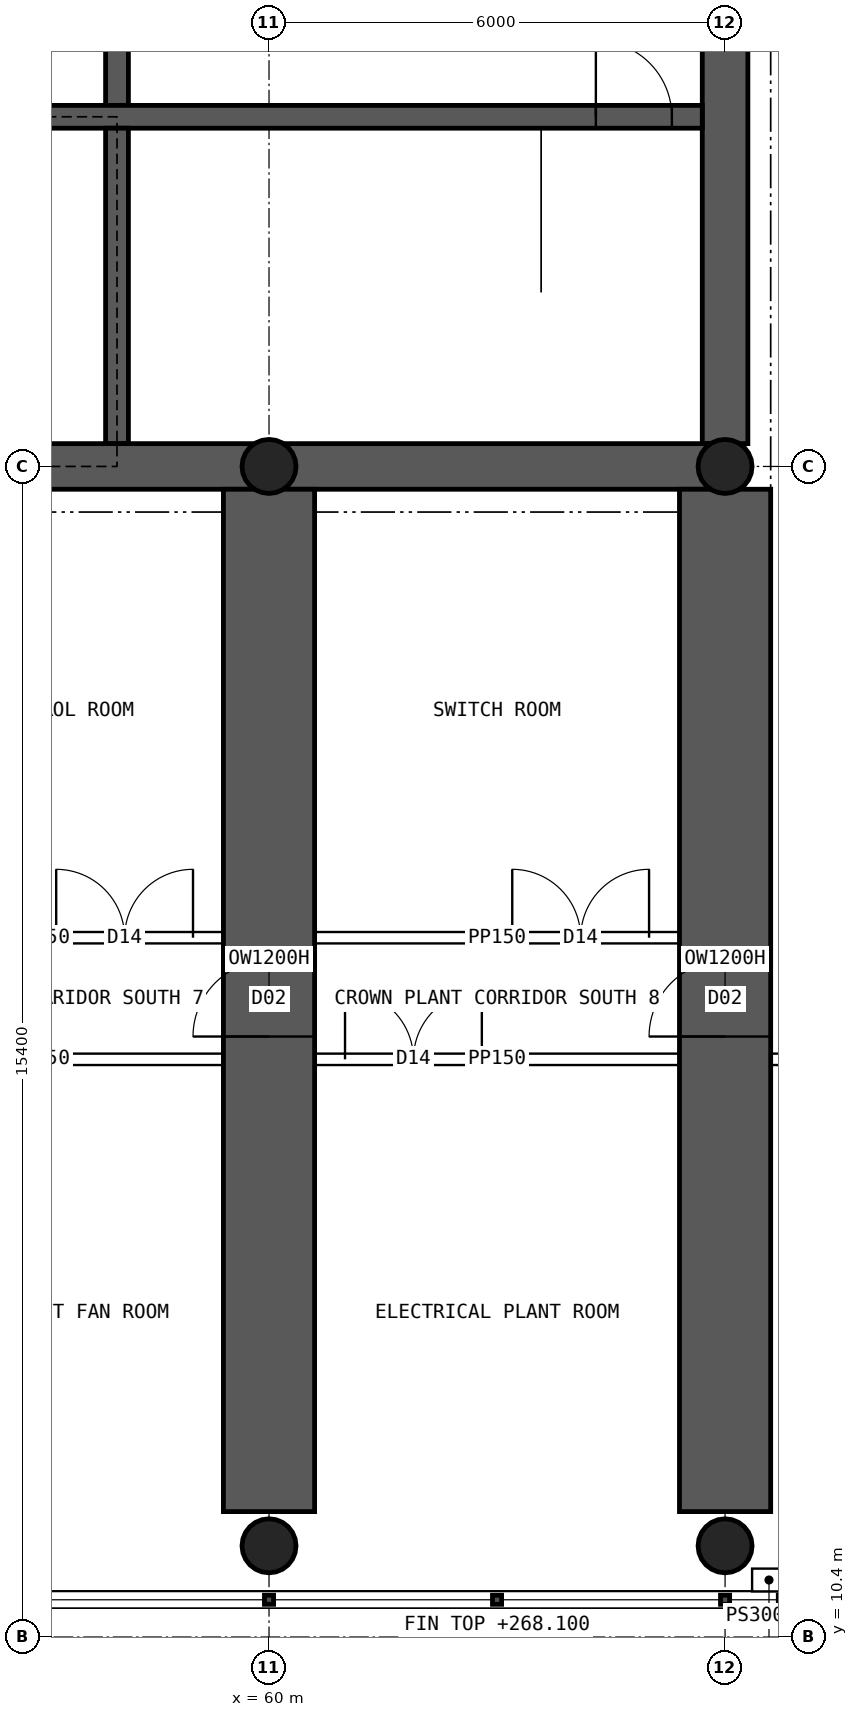
"""IFC4 building model, lengths in metres.
Left out: names, types, materials, properties, quantities, classifications, styles, units other than length and angle.
Written with IfcOpenShell. Run it as: python <this file> out.ifc"""

import sys

from ifc_helpers import new_model, si_unit, direction, frame, frame_2d, origin, origin_2d, place, context, subcontext, project, spatial, polyline, rectangle, hollow_circle, outline, extrude, element, fill, save


model = new_model("IFC4")
c1 = context("Model", 3, precision=1e-05, world=origin(), true_north=direction((0.0, 1.0)))
c2 = subcontext(c1, "Body", "Model", "MODEL_VIEW")
j1 = project(units=[si_unit("LENGTHUNIT", "METRE"), si_unit("PLANEANGLEUNIT", "RADIAN")], contexts=[c1])
p1 = place(None, origin())
s1 = spatial("IfcSite", under=j1, at=p1, CompositionType="ELEMENT")
p2 = place(p1, origin())
s2 = spatial("IfcBuilding", under=s1, at=p2, CompositionType="ELEMENT")
p3 = place(p2, frame((0.0, 0.0, 262.3)))
s3 = spatial("IfcBuildingStorey", under=s2, at=p3, CompositionType="ELEMENT", Elevation=262.3)
p4 = place(p3, frame((18.0, 25.8, 0.0), z_axis=(0.0, 0.0, 1.0), x_axis=(1.0, 0.0, 0.0)))
e1 = element("IfcWall", 1, at=p4, inside=s3, PredefinedType="SHEAR", context=c2, shape_type="SweptSolid", body=[
    extrude(rectangle(XDim=48.0, YDim=0.6, at=frame_2d((24.0, 0.0))), origin(), (0.0, 0.0, 1.0), 6.0),
])
p5 = place(p3, frame((66.0, 26.1, 0.0), z_axis=(0.0, 0.0, 1.0), x_axis=(0.0, 1.0, 0.0)))
e2 = element("IfcWall", 2, at=p5, inside=s3, PredefinedType="SHEAR", context=c2, shape_type="SweptSolid", body=[
    extrude(rectangle(XDim=11.8, YDim=0.6, at=frame_2d((5.9, 0.0))), origin(), (0.0, 0.0, 1.0), 6.0),
])
p6 = place(p5, frame((5.2, 0.0, 0.0)))
e3 = element("IfcOpeningElement", 3, at=p6, cuts=e2, PredefinedType="OPENING", context=c2, shape_type="SweptSolid", body=[
    extrude(rectangle(XDim=1.2, YDim=2.1, at=frame_2d((0.6, 1.05))), frame((0.0, 0.31, 0.0), z_axis=(0.0, -1.0, 0.0), x_axis=(1.0, 0.0, 0.0)), (0.0, 0.0, 1.0), 0.62),
])
p7 = place(p3, frame((18.3, 30.4, 0.0), z_axis=(0.0, 0.0, 1.0), x_axis=(1.0, 0.0, 0.0)))
e4 = element("IfcWall", 4, at=p7, inside=s3, PredefinedType="SHEAR", context=c2, shape_type="SweptSolid", body=[
    extrude(rectangle(XDim=47.4, YDim=0.3, at=frame_2d((23.7, 0.0))), origin(), (0.0, 0.0, 1.0), 6.0),
])
p8 = place(p7, frame((0.4, 0.0, 0.0)))
e5 = element("IfcOpeningElement", 5, at=p8, cuts=e4, PredefinedType="OPENING", context=c2, shape_type="SweptSolid", body=[
    extrude(rectangle(XDim=1.0, YDim=2.1, at=frame_2d((0.5, 1.05))), frame((0.0, 0.16, 0.0), z_axis=(0.0, -1.0, 0.0), x_axis=(1.0, 0.0, 0.0)), (0.0, 0.0, 1.0), 0.32),
])
p9 = place(p7, frame((46.0, 0.0, 0.0)))
e6 = element("IfcOpeningElement", 6, at=p9, cuts=e4, PredefinedType="OPENING", context=c2, shape_type="SweptSolid", body=[
    extrude(rectangle(XDim=1.0, YDim=2.1, at=frame_2d((0.5, 1.05))), frame((0.0, 0.16, 0.0), z_axis=(0.0, -1.0, 0.0), x_axis=(1.0, 0.0, 0.0)), (0.0, 0.0, 1.0), 0.32),
])
p10 = place(p7, frame((19.025, 0.0, 0.0)))
e7 = element("IfcOpeningElement", 7, at=p10, cuts=e4, PredefinedType="OPENING", context=c2, shape_type="SweptSolid", body=[
    extrude(rectangle(XDim=0.9, YDim=2.1, at=frame_2d((0.45, 1.05))), frame((0.0, 0.16, 0.0), z_axis=(0.0, -1.0, 0.0), x_axis=(1.0, 0.0, 0.0)), (0.0, 0.0, 1.0), 0.32),
])
p11 = place(p7, frame((24.525, 0.0, 0.0)))
e8 = element("IfcOpeningElement", 8, at=p11, cuts=e4, PredefinedType="OPENING", context=c2, shape_type="SweptSolid", body=[
    extrude(rectangle(XDim=0.9, YDim=2.1, at=frame_2d((0.45, 1.05))), frame((0.0, 0.16, 0.0), z_axis=(0.0, -1.0, 0.0), x_axis=(1.0, 0.0, 0.0)), (0.0, 0.0, 1.0), 0.32),
])
p12 = place(p7, frame((30.317, 0.0, 0.0)))
e9 = element("IfcOpeningElement", 9, at=p12, cuts=e4, PredefinedType="OPENING", context=c2, shape_type="SweptSolid", body=[
    extrude(rectangle(XDim=1.1, YDim=2.1, at=frame_2d((0.55, 1.05))), frame((0.0, 0.16, 0.0), z_axis=(0.0, -1.0, 0.0), x_axis=(1.0, 0.0, 0.0)), (0.0, 0.0, 1.0), 0.32),
])
p13 = place(p7, frame((33.85, 0.0, 0.0)))
e10 = element("IfcOpeningElement", 10, at=p13, cuts=e4, PredefinedType="OPENING", context=c2, shape_type="SweptSolid", body=[
    extrude(rectangle(XDim=1.1, YDim=2.1, at=frame_2d((0.55, 1.05))), frame((0.0, 0.16, 0.0), z_axis=(0.0, -1.0, 0.0), x_axis=(1.0, 0.0, 0.0)), (0.0, 0.0, 1.0), 0.32),
])
p14 = place(p7, frame((37.383, 0.0, 0.0)))
e11 = element("IfcOpeningElement", 11, at=p14, cuts=e4, PredefinedType="OPENING", context=c2, shape_type="SweptSolid", body=[
    extrude(rectangle(XDim=1.1, YDim=2.1, at=frame_2d((0.55, 1.05))), frame((0.0, 0.16, 0.0), z_axis=(0.0, -1.0, 0.0), x_axis=(1.0, 0.0, 0.0)), (0.0, 0.0, 1.0), 0.32),
])
p15 = place(p3, frame((58.0, 26.1, 0.0), z_axis=(0.0, 0.0, 1.0), x_axis=(0.0, 1.0, 0.0)))
e12 = element("IfcWall", 12, at=p15, inside=s3, PredefinedType="SHEAR", context=c2, shape_type="SweptSolid", body=[
    extrude(rectangle(XDim=4.15, YDim=0.3, at=frame_2d((2.075, 0.0))), origin(), (0.0, 0.0, 1.0), 6.0),
])
p16 = place(p3, frame((58.0, 30.55, 0.0), z_axis=(0.0, 0.0, 1.0), x_axis=(0.0, 1.0, 0.0)))
e13 = element("IfcWall", 13, at=p16, inside=s3, PredefinedType="SHEAR", context=c2, shape_type="SweptSolid", body=[
    extrude(rectangle(XDim=3.9, YDim=0.3, at=frame_2d((1.95, 0.0))), origin(), (0.0, 0.0, 1.0), 6.0),
])
p17 = place(p16, frame((1.4, 0.0, 0.0)))
e14 = element("IfcOpeningElement", 14, at=p17, cuts=e13, PredefinedType="OPENING", context=c2, shape_type="SweptSolid", body=[
    extrude(rectangle(XDim=1.2, YDim=2.1, at=frame_2d((0.6, 1.05))), frame((0.0, 0.16, 0.0), z_axis=(0.0, -1.0, 0.0), x_axis=(1.0, 0.0, 0.0)), (0.0, 0.0, 1.0), 0.32),
])
p18 = place(p3, frame((60.0, 12.05, 0.0), z_axis=(0.0, 0.0, 1.0), x_axis=(0.0, 1.0, 0.0)))
e15 = element("IfcWall", 15, at=p18, inside=s3, PredefinedType="SHEAR", context=c2, shape_type="SweptSolid", body=[
    extrude(rectangle(XDim=13.45, YDim=1.2, at=frame_2d((6.725, 0.0))), origin(), (0.0, 0.0, 1.0), 4.4),
])
p19 = place(p18, frame((6.25, 0.0, 0.0)))
e16 = element("IfcOpeningElement", 16, at=p19, cuts=e15, PredefinedType="OPENING", context=c2, shape_type="SweptSolid", body=[
    extrude(rectangle(XDim=1.0, YDim=2.1, at=frame_2d((0.5, 1.05))), frame((0.0, 0.61, 0.0), z_axis=(0.0, -1.0, 0.0), x_axis=(1.0, 0.0, 0.0)), (0.0, 0.0, 1.0), 1.22),
])
p20 = place(p3, frame((66.0, 12.05, 0.0), z_axis=(0.0, 0.0, 1.0), x_axis=(0.0, 1.0, 0.0)))
e17 = element("IfcWall", 17, at=p20, inside=s3, PredefinedType="SHEAR", context=c2, shape_type="SweptSolid", body=[
    extrude(rectangle(XDim=13.45, YDim=1.2, at=frame_2d((6.725, 0.0))), origin(), (0.0, 0.0, 1.0), 4.4),
])
p21 = place(p20, frame((6.25, 0.0, 0.0)))
e18 = element("IfcOpeningElement", 18, at=p21, cuts=e17, PredefinedType="OPENING", context=c2, shape_type="SweptSolid", body=[
    extrude(rectangle(XDim=1.0, YDim=2.1, at=frame_2d((0.5, 1.05))), frame((0.0, 0.61, 0.0), z_axis=(0.0, -1.0, 0.0), x_axis=(1.0, 0.0, 0.0)), (0.0, 0.0, 1.0), 1.22),
])
p22 = place(p3, frame((60.0, 11.6, 0.0), z_axis=(0.0, 0.0, 1.0), x_axis=(1.0, 0.0, 0.0)))
e19 = element("IfcColumn", 19, at=p22, inside=s3, PredefinedType="COLUMN", context=c2, shape_type="SweptSolid", body=[
    extrude(hollow_circle(Radius=0.355, WallThickness=0.025, at=origin_2d()), origin(), (0.0, 0.0, 1.0), 4.885),
])
p23 = place(p3, frame((60.0, 25.8, 0.0), z_axis=(0.0, 0.0, 1.0), x_axis=(1.0, 0.0, 0.0)))
e20 = element("IfcColumn", 20, at=p23, inside=s3, PredefinedType="COLUMN", context=c2, shape_type="SweptSolid", body=[
    extrude(hollow_circle(Radius=0.355, WallThickness=0.025, at=origin_2d()), origin(), (0.0, 0.0, 1.0), 8.426),
])
p24 = place(p3, frame((66.0, 11.6, 0.0), z_axis=(0.0, 0.0, 1.0), x_axis=(1.0, 0.0, 0.0)))
e21 = element("IfcColumn", 21, at=p24, inside=s3, PredefinedType="COLUMN", context=c2, shape_type="SweptSolid", body=[
    extrude(hollow_circle(Radius=0.355, WallThickness=0.025, at=origin_2d()), origin(), (0.0, 0.0, 1.0), 4.885),
])
p25 = place(p3, frame((66.0, 25.8, 0.0), z_axis=(0.0, 0.0, 1.0), x_axis=(1.0, 0.0, 0.0)))
e22 = element("IfcColumn", 22, at=p25, inside=s3, PredefinedType="COLUMN", context=c2, shape_type="SweptSolid", body=[
    extrude(hollow_circle(Radius=0.355, WallThickness=0.025, at=origin_2d()), origin(), (0.0, 0.0, 1.0), 8.426),
])
p26 = place(p3, frame((66.8, 11.15, 0.0), z_axis=(0.0, 0.0, 1.0), x_axis=(-1.0, 0.0, 0.0)))
e23 = element("IfcWall", 23, at=p26, inside=s3, PredefinedType="SOLIDWALL", context=c2, shape_type="SweptSolid", body=[
    extrude(outline(polyline([(0.0, 0.0), (0.445, 0.0), (0.445, 5.837), (0.0, 5.837), (0.0, 0.0)])), frame((0.0, 0.15, 0.0), z_axis=(0.0, -1.0, 0.0), x_axis=(1.0, 0.0, 0.0)), (0.0, 0.0, 1.0), 0.3),
])
p27 = place(p3, frame((66.6, 18.0, 0.0), z_axis=(0.0, 0.0, 1.0), x_axis=(1.0, 0.0, 0.0)))
e24 = element("IfcWall", 24, at=p27, inside=s3, PredefinedType="PARTITIONING", context=c2, shape_type="SweptSolid", body=[
    extrude(rectangle(XDim=1.8, YDim=0.15, at=frame_2d((0.9, 0.0))), origin(), (0.0, 0.0, 1.0), 6.0),
])
p28 = place(p3, frame((54.6, 18.0, 0.0), z_axis=(0.0, 0.0, 1.0), x_axis=(1.0, 0.0, 0.0)))
e25 = element("IfcWall", 25, at=p28, inside=s3, PredefinedType="PARTITIONING", context=c2, shape_type="SweptSolid", body=[
    extrude(rectangle(XDim=4.8, YDim=0.15, at=frame_2d((2.4, 0.0))), origin(), (0.0, 0.0, 1.0), 6.0),
])
p29 = place(p28, frame((0.4, 0.0, 0.0)))
e26 = element("IfcOpeningElement", 26, at=p29, cuts=e25, PredefinedType="OPENING", context=c2, shape_type="SweptSolid", body=[
    extrude(rectangle(XDim=1.8, YDim=2.4, at=frame_2d((0.9, 1.2))), frame((0.0, 0.085, 0.0), z_axis=(0.0, -1.0, 0.0), x_axis=(1.0, 0.0, 0.0)), (0.0, 0.0, 1.0), 0.17),
])
p30 = place(p3, frame((54.6, 19.6, 0.0), z_axis=(0.0, 0.0, 1.0), x_axis=(1.0, 0.0, 0.0)))
e27 = element("IfcWall", 27, at=p30, inside=s3, PredefinedType="PARTITIONING", context=c2, shape_type="SweptSolid", body=[
    extrude(rectangle(XDim=4.8, YDim=0.15, at=frame_2d((2.4, 0.0))), origin(), (0.0, 0.0, 1.0), 6.0),
])
p31 = place(p30, frame((2.6, 0.0, 0.0)))
e28 = element("IfcOpeningElement", 28, at=p31, cuts=e27, PredefinedType="OPENING", context=c2, shape_type="SweptSolid", body=[
    extrude(rectangle(XDim=1.8, YDim=2.4, at=frame_2d((0.9, 1.2))), frame((0.0, 0.085, 0.0), z_axis=(0.0, -1.0, 0.0), x_axis=(1.0, 0.0, 0.0)), (0.0, 0.0, 1.0), 0.17),
])
p32 = place(p3, frame((60.6, 18.0, 0.0), z_axis=(0.0, 0.0, 1.0), x_axis=(1.0, 0.0, 0.0)))
e29 = element("IfcWall", 29, at=p32, inside=s3, PredefinedType="PARTITIONING", context=c2, shape_type="SweptSolid", body=[
    extrude(rectangle(XDim=4.8, YDim=0.15, at=frame_2d((2.4, 0.0))), origin(), (0.0, 0.0, 1.0), 6.0),
])
p33 = place(p32, frame((0.4, 0.0, 0.0)))
e30 = element("IfcOpeningElement", 30, at=p33, cuts=e29, PredefinedType="OPENING", context=c2, shape_type="SweptSolid", body=[
    extrude(rectangle(XDim=1.8, YDim=2.4, at=frame_2d((0.9, 1.2))), frame((0.0, 0.085, 0.0), z_axis=(0.0, -1.0, 0.0), x_axis=(1.0, 0.0, 0.0)), (0.0, 0.0, 1.0), 0.17),
])
p34 = place(p3, frame((60.6, 19.6, 0.0), z_axis=(0.0, 0.0, 1.0), x_axis=(1.0, 0.0, 0.0)))
e31 = element("IfcWall", 31, at=p34, inside=s3, PredefinedType="PARTITIONING", context=c2, shape_type="SweptSolid", body=[
    extrude(rectangle(XDim=4.8, YDim=0.15, at=frame_2d((2.4, 0.0))), origin(), (0.0, 0.0, 1.0), 6.0),
])
p35 = place(p34, frame((2.6, 0.0, 0.0)))
e32 = element("IfcOpeningElement", 32, at=p35, cuts=e31, PredefinedType="OPENING", context=c2, shape_type="SweptSolid", body=[
    extrude(rectangle(XDim=1.8, YDim=2.4, at=frame_2d((0.9, 1.2))), frame((0.0, 0.085, 0.0), z_axis=(0.0, -1.0, 0.0), x_axis=(1.0, 0.0, 0.0)), (0.0, 0.0, 1.0), 0.17),
])
p36 = place(p9, origin())
e33 = element("IfcDoor", 33, at=p36, inside=s3, OperationType="SINGLE_SWING_LEFT", PredefinedType="DOOR", context=c2, shape_type="SweptSolid", body=[
    extrude(rectangle(XDim=1.0, YDim=2.1, at=frame_2d((0.5, 1.05))), frame((0.0, 0.025, 0.0), z_axis=(0.0, -1.0, 0.0), x_axis=(1.0, 0.0, 0.0)), (0.0, 0.0, 1.0), 0.05),
])
fill(e6, e33)
p37 = place(p19, origin())
e34 = element("IfcDoor", 34, at=p37, inside=s3, OperationType="SINGLE_SWING_LEFT", PredefinedType="DOOR", context=c2, shape_type="SweptSolid", body=[
    extrude(rectangle(XDim=1.0, YDim=2.1, at=frame_2d((0.5, 1.05))), frame((0.0, 0.025, 0.0), z_axis=(0.0, -1.0, 0.0), x_axis=(1.0, 0.0, 0.0)), (0.0, 0.0, 1.0), 0.05),
])
fill(e16, e34)
p38 = place(p21, origin())
e35 = element("IfcDoor", 35, at=p38, inside=s3, OperationType="SINGLE_SWING_LEFT", PredefinedType="DOOR", context=c2, shape_type="SweptSolid", body=[
    extrude(rectangle(XDim=1.0, YDim=2.1, at=frame_2d((0.5, 1.05))), frame((0.0, 0.025, 0.0), z_axis=(0.0, -1.0, 0.0), x_axis=(1.0, 0.0, 0.0)), (0.0, 0.0, 1.0), 0.05),
])
fill(e18, e35)
p39 = place(p31, origin())
e36 = element("IfcDoor", 36, at=p39, inside=s3, OperationType="DOUBLE_DOOR_SINGLE_SWING", PredefinedType="DOOR", context=c2, shape_type="SweptSolid", body=[
    extrude(rectangle(XDim=1.8, YDim=2.4, at=frame_2d((0.9, 1.2))), frame((0.0, 0.025, 0.0), z_axis=(0.0, -1.0, 0.0), x_axis=(1.0, 0.0, 0.0)), (0.0, 0.0, 1.0), 0.05),
])
fill(e28, e36)
p40 = place(p33, origin())
e37 = element("IfcDoor", 37, at=p40, inside=s3, OperationType="DOUBLE_DOOR_SINGLE_SWING", PredefinedType="DOOR", context=c2, shape_type="SweptSolid", body=[
    extrude(rectangle(XDim=1.8, YDim=2.4, at=frame_2d((0.9, 1.2))), frame((0.0, 0.025, 0.0), z_axis=(0.0, -1.0, 0.0), x_axis=(1.0, 0.0, 0.0)), (0.0, 0.0, 1.0), 0.05),
])
fill(e30, e37)
p41 = place(p35, origin())
e38 = element("IfcDoor", 38, at=p41, inside=s3, OperationType="DOUBLE_DOOR_SINGLE_SWING", PredefinedType="DOOR", context=c2, shape_type="SweptSolid", body=[
    extrude(rectangle(XDim=1.8, YDim=2.4, at=frame_2d((0.9, 1.2))), frame((0.0, 0.025, 0.0), z_axis=(0.0, -1.0, 0.0), x_axis=(1.0, 0.0, 0.0)), (0.0, 0.0, 1.0), 0.05),
])
fill(e32, e38)
save(model, sys.argv[1])
